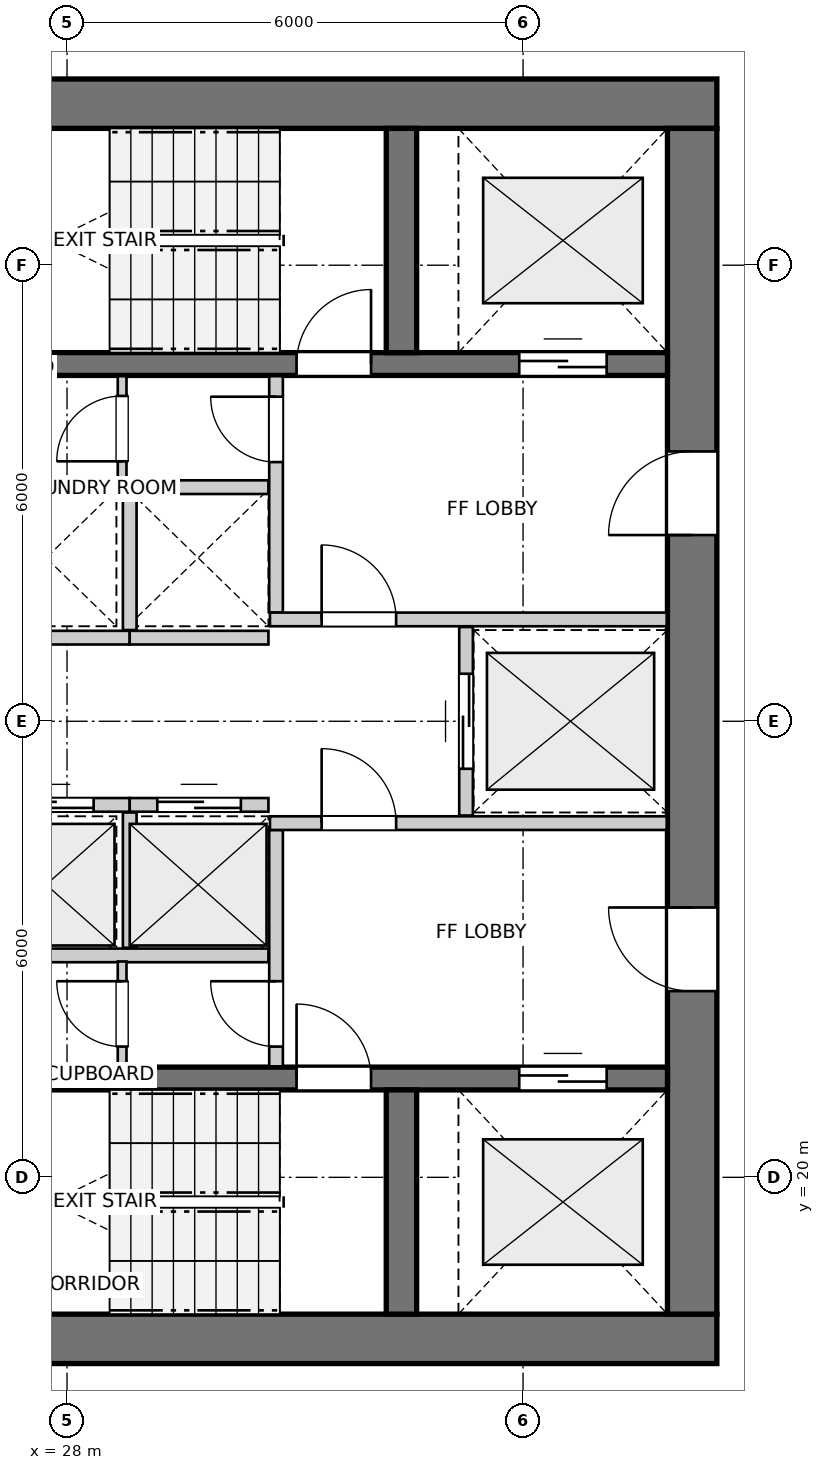
"""IFC4 building model, lengths in metres.
Left out: names, types, materials, properties, quantities, classifications, styles, units other than length and angle.
Written with IfcOpenShell. Run it as: python <this file> out.ifc"""

import sys

from ifc_helpers import new_model, si_unit, direction, frame, frame_2d, origin, place, context, subcontext, project, spatial, rectangle, extrude, source, transform, mapped, element, fill, save


model = new_model("IFC4")
c1 = context("Model", 3, precision=1e-05, world=origin(), true_north=direction((0.0, 1.0)))
c2 = subcontext(c1, "Body", "Model", "MODEL_VIEW")
j1 = project(units=[si_unit("LENGTHUNIT", "METRE"), si_unit("PLANEANGLEUNIT", "RADIAN")], contexts=[c1])
p1 = place(None, origin())
s1 = spatial("IfcSite", under=j1, at=p1, CompositionType="ELEMENT")
p2 = place(p1, origin())
s2 = spatial("IfcBuilding", under=s1, at=p2, CompositionType="ELEMENT")
p3 = place(p2, frame((0.0, 0.0, 92.8)))
s3 = spatial("IfcBuildingStorey", under=s2, at=p3, CompositionType="ELEMENT", Elevation=92.8)
for number, where, z_axis, x_axis in (
    (1, (24.15, 17.875, 0.0), (0.0, 0.0, 1.0), (1.0, 0.0, 0.0)),
    (2, (36.55, 34.125, 0.0), (0.0, 0.0, 1.0), (-1.0, 0.0, 0.0)),
):
    element("IfcWall", number, at=place(p3, frame(where, z_axis=z_axis, x_axis=x_axis)), inside=s3, PredefinedType="SHEAR", context=c2, shape_type="SweptSolid", body=[
        extrude(rectangle(XDim=12.4, YDim=0.65, at=frame_2d((6.2, 0.0))), origin(), (0.0, 0.0, 1.0), 2.95),
    ])
p4 = place(p3, frame((36.225, 18.2, 0.0), z_axis=(0.0, 0.0, 1.0), x_axis=(0.0, 1.0, 0.0)))
e3 = element("IfcWall", 3, at=p4, inside=s3, PredefinedType="SHEAR", context=c2, shape_type="SweptSolid", body=[
    extrude(rectangle(XDim=15.6, YDim=0.65, at=frame_2d((7.8, 0.0))), origin(), (0.0, 0.0, 1.0), 2.95),
])
p5 = place(p4, frame((4.25, 0.0, 0.0)))
e4 = element("IfcOpeningElement", 4, at=p5, cuts=e3, PredefinedType="OPENING", context=c2, shape_type="SweptSolid", body=[
    extrude(rectangle(XDim=1.1, YDim=2.15, at=frame_2d((0.55, 1.075))), frame((0.0, 0.335, 0.0), z_axis=(0.0, -1.0, 0.0), x_axis=(1.0, 0.0, 0.0)), (0.0, 0.0, 1.0), 0.67),
])
p6 = place(p4, frame((10.25, 0.0, 0.0)))
e5 = element("IfcOpeningElement", 5, at=p6, cuts=e3, PredefinedType="OPENING", context=c2, shape_type="SweptSolid", body=[
    extrude(rectangle(XDim=1.1, YDim=2.15, at=frame_2d((0.55, 1.075))), frame((0.0, 0.335, 0.0), z_axis=(0.0, -1.0, 0.0), x_axis=(1.0, 0.0, 0.0)), (0.0, 0.0, 1.0), 0.67),
])
p7 = place(p3, frame((24.8, 21.3, 0.0), z_axis=(0.0, 0.0, 1.0), x_axis=(1.0, 0.0, 0.0)))
e6 = element("IfcWall", 6, at=p7, inside=s3, PredefinedType="SHEAR", context=c2, shape_type="SweptSolid", body=[
    extrude(rectangle(XDim=11.1, YDim=0.3, at=frame_2d((5.55, 0.0))), origin(), (0.0, 0.0, 1.0), 2.95),
])
p8 = place(p7, frame((6.22, 0.0, 0.0)))
e7 = element("IfcOpeningElement", 7, at=p8, cuts=e6, PredefinedType="OPENING", context=c2, shape_type="SweptSolid", body=[
    extrude(rectangle(XDim=0.98, YDim=2.15, at=frame_2d((0.49, 1.075))), frame((0.0, 0.16, 0.0), z_axis=(0.0, -1.0, 0.0), x_axis=(1.0, 0.0, 0.0)), (0.0, 0.0, 1.0), 0.32),
])
p9 = place(p7, frame((9.15, 0.0, 0.0)))
e8 = element("IfcOpeningElement", 8, at=p9, cuts=e6, PredefinedType="OPENING", context=c2, shape_type="SweptSolid", body=[
    extrude(rectangle(XDim=1.15, YDim=2.15, at=frame_2d((0.575, 1.075))), frame((0.0, 0.16, 0.0), z_axis=(0.0, -1.0, 0.0), x_axis=(1.0, 0.0, 0.0)), (0.0, 0.0, 1.0), 0.32),
])
p10 = place(p3, frame((32.4, 18.2, 0.0), z_axis=(0.0, 0.0, 1.0), x_axis=(0.0, 1.0, 0.0)))
e9 = element("IfcWall", 9, at=p10, inside=s3, PredefinedType="SHEAR", context=c2, shape_type="SweptSolid", body=[
    extrude(rectangle(XDim=2.95, YDim=0.4, at=frame_2d((1.475, 0.0))), origin(), (0.0, 0.0, 1.0), 2.95),
])
p11 = place(p3, frame((24.8, 30.7, 0.0), z_axis=(0.0, 0.0, 1.0), x_axis=(1.0, 0.0, 0.0)))
e10 = element("IfcWall", 10, at=p11, inside=s3, PredefinedType="SHEAR", context=c2, shape_type="SweptSolid", body=[
    extrude(rectangle(XDim=11.1, YDim=0.3, at=frame_2d((5.55, 0.0))), origin(), (0.0, 0.0, 1.0), 2.95),
])
p12 = place(p11, frame((6.22, 0.0, 0.0)))
e11 = element("IfcOpeningElement", 11, at=p12, cuts=e10, PredefinedType="OPENING", context=c2, shape_type="SweptSolid", body=[
    extrude(rectangle(XDim=0.98, YDim=2.15, at=frame_2d((0.49, 1.075))), frame((0.0, 0.16, 0.0), z_axis=(0.0, -1.0, 0.0), x_axis=(1.0, 0.0, 0.0)), (0.0, 0.0, 1.0), 0.32),
])
p13 = place(p11, frame((9.15, 0.0, 0.0)))
e12 = element("IfcOpeningElement", 12, at=p13, cuts=e10, PredefinedType="OPENING", context=c2, shape_type="SweptSolid", body=[
    extrude(rectangle(XDim=1.15, YDim=2.15, at=frame_2d((0.575, 1.075))), frame((0.0, 0.16, 0.0), z_axis=(0.0, -1.0, 0.0), x_axis=(1.0, 0.0, 0.0)), (0.0, 0.0, 1.0), 0.32),
])
p14 = place(p3, frame((32.4, 30.85, 0.0), z_axis=(0.0, 0.0, 1.0), x_axis=(0.0, 1.0, 0.0)))
e13 = element("IfcWall", 13, at=p14, inside=s3, PredefinedType="SHEAR", context=c2, shape_type="SweptSolid", body=[
    extrude(rectangle(XDim=2.95, YDim=0.4, at=frame_2d((1.475, 0.0))), origin(), (0.0, 0.0, 1.0), 2.95),
])
p15 = place(p3, frame((30.75, 21.46, 0.0), z_axis=(0.0, 0.0, 1.0), x_axis=(0.0, 1.0, 0.0)))
e14 = element("IfcWall", 14, at=p15, inside=s3, PredefinedType="PARTITIONING", context=c2, shape_type="SweptSolid", body=[
    extrude(rectangle(XDim=3.11, YDim=0.18, at=frame_2d((1.555, 0.0))), origin(), (0.0, 0.0, 1.0), 2.95),
])
p16 = place(p15, frame((0.26, 0.0, 0.0)))
e15 = element("IfcOpeningElement", 15, at=p16, cuts=e14, PredefinedType="OPENING", context=c2, shape_type="SweptSolid", body=[
    extrude(rectangle(XDim=0.86, YDim=2.05, at=frame_2d((0.43, 1.025))), frame((0.0, 0.1, 0.0), z_axis=(0.0, -1.0, 0.0), x_axis=(1.0, 0.0, 0.0)), (0.0, 0.0, 1.0), 0.2),
])
p17 = place(p3, frame((30.67, 24.66, 0.0), z_axis=(0.0, 0.0, 1.0), x_axis=(1.0, 0.0, 0.0)))
e16 = element("IfcWall", 16, at=p17, inside=s3, PredefinedType="PARTITIONING", context=c2, shape_type="SweptSolid", body=[
    extrude(rectangle(XDim=5.22, YDim=0.18, at=frame_2d((2.61, 0.0))), origin(), (0.0, 0.0, 1.0), 2.95),
])
p18 = place(p17, frame((0.68, 0.0, 0.0)))
e17 = element("IfcOpeningElement", 17, at=p18, cuts=e16, PredefinedType="OPENING", context=c2, shape_type="SweptSolid", body=[
    extrude(rectangle(XDim=0.98, YDim=2.15, at=frame_2d((0.49, 1.075))), frame((0.0, 0.1, 0.0), z_axis=(0.0, -1.0, 0.0), x_axis=(1.0, 0.0, 0.0)), (0.0, 0.0, 1.0), 0.2),
])
p19 = place(p3, frame((30.75, 27.43, 0.0), z_axis=(0.0, 0.0, 1.0), x_axis=(0.0, 1.0, 0.0)))
e18 = element("IfcWall", 18, at=p19, inside=s3, PredefinedType="PARTITIONING", context=c2, shape_type="SweptSolid", body=[
    extrude(rectangle(XDim=3.11, YDim=0.18, at=frame_2d((1.555, 0.0))), origin(), (0.0, 0.0, 1.0), 2.95),
])
p20 = place(p19, frame((1.98, 0.0, 0.0)))
e19 = element("IfcOpeningElement", 19, at=p20, cuts=e18, PredefinedType="OPENING", context=c2, shape_type="SweptSolid", body=[
    extrude(rectangle(XDim=0.86, YDim=2.05, at=frame_2d((0.43, 1.025))), frame((0.0, 0.1, 0.0), z_axis=(0.0, -1.0, 0.0), x_axis=(1.0, 0.0, 0.0)), (0.0, 0.0, 1.0), 0.2),
])
p21 = place(p3, frame((30.67, 27.34, 0.0), z_axis=(0.0, 0.0, 1.0), x_axis=(1.0, 0.0, 0.0)))
e20 = element("IfcWall", 20, at=p21, inside=s3, PredefinedType="PARTITIONING", context=c2, shape_type="SweptSolid", body=[
    extrude(rectangle(XDim=5.22, YDim=0.18, at=frame_2d((2.61, 0.0))), origin(), (0.0, 0.0, 1.0), 2.95),
])
p22 = place(p21, frame((0.68, 0.0, 0.0)))
e21 = element("IfcOpeningElement", 21, at=p22, cuts=e20, PredefinedType="OPENING", context=c2, shape_type="SweptSolid", body=[
    extrude(rectangle(XDim=0.98, YDim=2.15, at=frame_2d((0.49, 1.075))), frame((0.0, 0.1, 0.0), z_axis=(0.0, -1.0, 0.0), x_axis=(1.0, 0.0, 0.0)), (0.0, 0.0, 1.0), 0.2),
])
p23 = place(p3, frame((33.25, 24.76, 0.0), z_axis=(0.0, 0.0, 1.0), x_axis=(0.0, 1.0, 0.0)))
e22 = element("IfcWall", 22, at=p23, inside=s3, PredefinedType="PARTITIONING", context=c2, shape_type="SweptSolid", body=[
    extrude(rectangle(XDim=2.48, YDim=0.18, at=frame_2d((1.24, 0.0))), origin(), (0.0, 0.0, 1.0), 2.95),
])
p24 = place(p23, frame((0.615, 0.0, 0.0)))
e23 = element("IfcOpeningElement", 23, at=p24, cuts=e22, PredefinedType="OPENING", context=c2, shape_type="SweptSolid", body=[
    extrude(rectangle(XDim=1.25, YDim=2.15, at=frame_2d((0.625, 1.075))), frame((0.0, 0.1, 0.0), z_axis=(0.0, -1.0, 0.0), x_axis=(1.0, 0.0, 0.0)), (0.0, 0.0, 1.0), 0.2),
])
p25 = place(p3, frame((24.81, 22.92, 0.0), z_axis=(0.0, 0.0, 1.0), x_axis=(1.0, 0.0, 0.0)))
e24 = element("IfcWall", 24, at=p25, inside=s3, PredefinedType="PARTITIONING", context=c2, shape_type="SweptSolid", body=[
    extrude(rectangle(XDim=5.84, YDim=0.18, at=frame_2d((2.92, 0.0))), origin(), (0.0, 0.0, 1.0), 2.95),
])
p26 = place(p3, frame((26.775, 24.9, 0.0), z_axis=(0.0, 0.0, 1.0), x_axis=(1.0, 0.0, 0.0)))
e25 = element("IfcWall", 25, at=p26, inside=s3, PredefinedType="PARTITIONING", context=c2, shape_type="SweptSolid", body=[
    extrude(rectangle(XDim=2.05, YDim=0.18, at=frame_2d((1.025, 0.0))), origin(), (0.0, 0.0, 1.0), 2.95),
])
p27 = place(p26, frame((0.475, 0.0, 0.0)))
e26 = element("IfcOpeningElement", 26, at=p27, cuts=e25, PredefinedType="OPENING", context=c2, shape_type="SweptSolid", body=[
    extrude(rectangle(XDim=1.1, YDim=2.15, at=frame_2d((0.55, 1.075))), frame((0.0, 0.1, 0.0), z_axis=(0.0, -1.0, 0.0), x_axis=(1.0, 0.0, 0.0)), (0.0, 0.0, 1.0), 0.2),
])
p28 = place(p3, frame((28.825, 24.9, 0.0), z_axis=(0.0, 0.0, 1.0), x_axis=(1.0, 0.0, 0.0)))
e27 = element("IfcWall", 27, at=p28, inside=s3, PredefinedType="PARTITIONING", context=c2, shape_type="SweptSolid", body=[
    extrude(rectangle(XDim=1.825, YDim=0.18, at=frame_2d((0.913, 0.0))), origin(), (0.0, 0.0, 1.0), 2.95),
])
p29 = place(p28, frame((0.363, 0.0, 0.0)))
e28 = element("IfcOpeningElement", 28, at=p29, cuts=e27, PredefinedType="OPENING", context=c2, shape_type="SweptSolid", body=[
    extrude(rectangle(XDim=1.1, YDim=2.15, at=frame_2d((0.55, 1.075))), frame((0.0, 0.1, 0.0), z_axis=(0.0, -1.0, 0.0), x_axis=(1.0, 0.0, 0.0)), (0.0, 0.0, 1.0), 0.2),
])
p30 = place(p3, frame((28.825, 23.02, 0.0), z_axis=(0.0, 0.0, 1.0), x_axis=(0.0, 1.0, 0.0)))
e29 = element("IfcWall", 29, at=p30, inside=s3, PredefinedType="PARTITIONING", context=c2, shape_type="SweptSolid", body=[
    extrude(rectangle(XDim=1.78, YDim=0.18, at=frame_2d((0.89, 0.0))), origin(), (0.0, 0.0, 1.0), 2.95),
])
p31 = place(p3, frame((24.81, 29.08, 0.0), z_axis=(0.0, 0.0, 1.0), x_axis=(1.0, 0.0, 0.0)))
e30 = element("IfcWall", 30, at=p31, inside=s3, PredefinedType="PARTITIONING", context=c2, shape_type="SweptSolid", body=[
    extrude(rectangle(XDim=5.84, YDim=0.18, at=frame_2d((2.92, 0.0))), origin(), (0.0, 0.0, 1.0), 2.95),
])
p32 = place(p3, frame((26.775, 27.1, 0.0), z_axis=(0.0, 0.0, 1.0), x_axis=(1.0, 0.0, 0.0)))
e31 = element("IfcWall", 31, at=p32, inside=s3, PredefinedType="PARTITIONING", context=c2, shape_type="SweptSolid", body=[
    extrude(rectangle(XDim=2.05, YDim=0.18, at=frame_2d((1.025, 0.0))), origin(), (0.0, 0.0, 1.0), 2.95),
])
p33 = place(p3, frame((28.825, 27.1, 0.0), z_axis=(0.0, 0.0, 1.0), x_axis=(1.0, 0.0, 0.0)))
e32 = element("IfcWall", 32, at=p33, inside=s3, PredefinedType="PARTITIONING", context=c2, shape_type="SweptSolid", body=[
    extrude(rectangle(XDim=1.825, YDim=0.18, at=frame_2d((0.913, 0.0))), origin(), (0.0, 0.0, 1.0), 2.95),
])
p34 = place(p3, frame((28.825, 27.2, 0.0), z_axis=(0.0, 0.0, 1.0), x_axis=(0.0, 1.0, 0.0)))
e33 = element("IfcWall", 33, at=p34, inside=s3, PredefinedType="PARTITIONING", context=c2, shape_type="SweptSolid", body=[
    extrude(rectangle(XDim=1.78, YDim=0.18, at=frame_2d((0.89, 0.0))), origin(), (0.0, 0.0, 1.0), 2.95),
])
p35 = place(p3, frame((28.725, 21.46, 0.0), z_axis=(0.0, 0.0, 1.0), x_axis=(0.0, 1.0, 0.0)))
e34 = element("IfcWall", 34, at=p35, inside=s3, PredefinedType="PARTITIONING", context=c2, shape_type="SweptSolid", body=[
    extrude(rectangle(XDim=1.38, YDim=0.115, at=frame_2d((0.69, 0.0))), origin(), (0.0, 0.0, 1.0), 2.95),
])
p36 = place(p35, frame((0.26, 0.0, 0.0)))
e35 = element("IfcOpeningElement", 35, at=p36, cuts=e34, PredefinedType="OPENING", context=c2, shape_type="SweptSolid", body=[
    extrude(rectangle(XDim=0.86, YDim=2.05, at=frame_2d((0.43, 1.025))), frame((0.0, 0.067, 0.0), z_axis=(0.0, -1.0, 0.0), x_axis=(1.0, 0.0, 0.0)), (0.0, 0.0, 1.0), 0.135),
])
p37 = place(p3, frame((28.725, 29.16, 0.0), z_axis=(0.0, 0.0, 1.0), x_axis=(0.0, 1.0, 0.0)))
e36 = element("IfcWall", 36, at=p37, inside=s3, PredefinedType="PARTITIONING", context=c2, shape_type="SweptSolid", body=[
    extrude(rectangle(XDim=1.38, YDim=0.115, at=frame_2d((0.69, 0.0))), origin(), (0.0, 0.0, 1.0), 2.95),
])
p38 = place(p37, frame((0.26, 0.0, 0.0)))
e37 = element("IfcOpeningElement", 37, at=p38, cuts=e36, PredefinedType="OPENING", context=c2, shape_type="SweptSolid", body=[
    extrude(rectangle(XDim=0.86, YDim=2.05, at=frame_2d((0.43, 1.025))), frame((0.0, 0.067, 0.0), z_axis=(0.0, -1.0, 0.0), x_axis=(1.0, 0.0, 0.0)), (0.0, 0.0, 1.0), 0.135),
])
m1 = source(origin(), c2, "Body", "SweptSolid", [
    extrude(rectangle(XDim=0.98, YDim=2.15, at=frame_2d((0.49, 1.075))), frame((0.0, 0.025, 0.0), z_axis=(0.0, -1.0, 0.0), x_axis=(1.0, 0.0, 0.0)), (0.0, 0.0, 1.0), 0.05),
])
p39 = place(p8, origin())
e38 = element("IfcDoor", 38, at=p39, inside=s3, OperationType="SINGLE_SWING_LEFT", PredefinedType="DOOR", context=c2, shape_type="MappedRepresentation", body=[
    mapped(m1, transform((0.0, 0.0, 0.0), x_axis=(1.0, 0.0, 0.0), y_axis=(0.0, 1.0, 0.0), z_axis=(0.0, 0.0, 1.0), scale=1.0)),
])
fill(e7, e38)
m2 = source(origin(), c2, "Body", "SweptSolid", [
    extrude(rectangle(XDim=1.15, YDim=2.15, at=frame_2d((0.575, 1.075))), frame((0.0, 0.025, 0.0), z_axis=(0.0, -1.0, 0.0), x_axis=(1.0, 0.0, 0.0)), (0.0, 0.0, 1.0), 0.05),
])
p40 = place(p9, origin())
e39 = element("IfcDoor", 39, at=p40, inside=s3, OperationType="DOUBLE_DOOR_SLIDING", PredefinedType="DOOR", context=c2, shape_type="MappedRepresentation", body=[
    mapped(m2, transform((0.0, 0.0, 0.0), x_axis=(1.0, 0.0, 0.0), y_axis=(0.0, 1.0, 0.0), z_axis=(0.0, 0.0, 1.0), scale=1.0)),
])
fill(e8, e39)
p41 = place(p12, origin())
e40 = element("IfcDoor", 40, at=p41, inside=s3, OperationType="SINGLE_SWING_RIGHT", PredefinedType="DOOR", context=c2, shape_type="MappedRepresentation", body=[
    mapped(m1, transform((0.0, 0.0, 0.0), x_axis=(1.0, 0.0, 0.0), y_axis=(0.0, 1.0, 0.0), z_axis=(0.0, 0.0, 1.0), scale=1.0)),
])
fill(e11, e40)
p42 = place(p13, origin())
e41 = element("IfcDoor", 41, at=p42, inside=s3, OperationType="DOUBLE_DOOR_SLIDING", PredefinedType="DOOR", context=c2, shape_type="MappedRepresentation", body=[
    mapped(m2, transform((0.0, 0.0, 0.0), x_axis=(1.0, 0.0, 0.0), y_axis=(0.0, 1.0, 0.0), z_axis=(0.0, 0.0, 1.0), scale=1.0)),
])
fill(e12, e41)
m3 = source(origin(), c2, "Body", "SweptSolid", [
    extrude(rectangle(XDim=1.1, YDim=2.15, at=frame_2d((0.55, 1.075))), frame((0.0, 0.025, 0.0), z_axis=(0.0, -1.0, 0.0), x_axis=(1.0, 0.0, 0.0)), (0.0, 0.0, 1.0), 0.05),
])
p43 = place(p5, origin())
e42 = element("IfcDoor", 42, at=p43, inside=s3, OperationType="SINGLE_SWING_RIGHT", PredefinedType="DOOR", context=c2, shape_type="MappedRepresentation", body=[
    mapped(m3, transform((0.0, 0.0, 0.0), x_axis=(1.0, 0.0, 0.0), y_axis=(0.0, 1.0, 0.0), z_axis=(0.0, 0.0, 1.0), scale=1.0)),
])
fill(e4, e42)
p44 = place(p6, origin())
e43 = element("IfcDoor", 43, at=p44, inside=s3, OperationType="SINGLE_SWING_LEFT", PredefinedType="DOOR", context=c2, shape_type="MappedRepresentation", body=[
    mapped(m3, transform((0.0, 0.0, 0.0), x_axis=(1.0, 0.0, 0.0), y_axis=(0.0, 1.0, 0.0), z_axis=(0.0, 0.0, 1.0), scale=1.0)),
])
fill(e5, e43)
m4 = source(origin(), c2, "Body", "SweptSolid", [
    extrude(rectangle(XDim=0.86, YDim=2.05, at=frame_2d((0.43, 1.025))), frame((0.0, 0.025, 0.0), z_axis=(0.0, -1.0, 0.0), x_axis=(1.0, 0.0, 0.0)), (0.0, 0.0, 1.0), 0.05),
])
p45 = place(p16, origin())
e44 = element("IfcDoor", 44, at=p45, inside=s3, OperationType="SINGLE_SWING_RIGHT", PredefinedType="DOOR", context=c2, shape_type="MappedRepresentation", body=[
    mapped(m4, transform((0.0, 0.0, 0.0), x_axis=(1.0, 0.0, 0.0), y_axis=(0.0, 1.0, 0.0), z_axis=(0.0, 0.0, 1.0), scale=1.0)),
])
fill(e15, e44)
p46 = place(p18, origin())
e45 = element("IfcDoor", 45, at=p46, inside=s3, OperationType="SINGLE_SWING_LEFT", PredefinedType="DOOR", context=c2, shape_type="MappedRepresentation", body=[
    mapped(m1, transform((0.0, 0.0, 0.0), x_axis=(1.0, 0.0, 0.0), y_axis=(0.0, 1.0, 0.0), z_axis=(0.0, 0.0, 1.0), scale=1.0)),
])
fill(e17, e45)
p47 = place(p20, origin())
e46 = element("IfcDoor", 46, at=p47, inside=s3, OperationType="SINGLE_SWING_RIGHT", PredefinedType="DOOR", context=c2, shape_type="MappedRepresentation", body=[
    mapped(m4, transform((0.0, 0.0, 0.0), x_axis=(1.0, 0.0, 0.0), y_axis=(0.0, 1.0, 0.0), z_axis=(0.0, 0.0, 1.0), scale=1.0)),
])
fill(e19, e46)
p48 = place(p22, origin())
e47 = element("IfcDoor", 47, at=p48, inside=s3, OperationType="SINGLE_SWING_LEFT", PredefinedType="DOOR", context=c2, shape_type="MappedRepresentation", body=[
    mapped(m1, transform((0.0, 0.0, 0.0), x_axis=(1.0, 0.0, 0.0), y_axis=(0.0, 1.0, 0.0), z_axis=(0.0, 0.0, 1.0), scale=1.0)),
])
fill(e21, e47)
m5 = source(origin(), c2, "Body", "SweptSolid", [
    extrude(rectangle(XDim=1.25, YDim=2.15, at=frame_2d((0.625, 1.075))), frame((0.0, 0.025, 0.0), z_axis=(0.0, -1.0, 0.0), x_axis=(1.0, 0.0, 0.0)), (0.0, 0.0, 1.0), 0.05),
])
p49 = place(p24, origin())
e48 = element("IfcDoor", 48, at=p49, inside=s3, OperationType="DOUBLE_DOOR_SLIDING", PredefinedType="DOOR", context=c2, shape_type="MappedRepresentation", body=[
    mapped(m5, transform((0.0, 0.0, 0.0), x_axis=(1.0, 0.0, 0.0), y_axis=(0.0, 1.0, 0.0), z_axis=(0.0, 0.0, 1.0), scale=1.0)),
])
fill(e23, e48)
p50 = place(p27, origin())
e49 = element("IfcDoor", 49, at=p50, inside=s3, OperationType="DOUBLE_DOOR_SLIDING", PredefinedType="DOOR", context=c2, shape_type="MappedRepresentation", body=[
    mapped(m3, transform((0.0, 0.0, 0.0), x_axis=(1.0, 0.0, 0.0), y_axis=(0.0, 1.0, 0.0), z_axis=(0.0, 0.0, 1.0), scale=1.0)),
])
fill(e26, e49)
p51 = place(p29, origin())
e50 = element("IfcDoor", 50, at=p51, inside=s3, OperationType="DOUBLE_DOOR_SLIDING", PredefinedType="DOOR", context=c2, shape_type="MappedRepresentation", body=[
    mapped(m3, transform((0.0, 0.0, 0.0), x_axis=(1.0, 0.0, 0.0), y_axis=(0.0, 1.0, 0.0), z_axis=(0.0, 0.0, 1.0), scale=1.0)),
])
fill(e28, e50)
p52 = place(p36, origin())
e51 = element("IfcDoor", 51, at=p52, inside=s3, OperationType="SINGLE_SWING_RIGHT", PredefinedType="DOOR", context=c2, shape_type="MappedRepresentation", body=[
    mapped(m4, transform((0.0, 0.0, 0.0), x_axis=(1.0, 0.0, 0.0), y_axis=(0.0, 1.0, 0.0), z_axis=(0.0, 0.0, 1.0), scale=1.0)),
])
fill(e35, e51)
p53 = place(p38, origin())
e52 = element("IfcDoor", 52, at=p53, inside=s3, OperationType="SINGLE_SWING_LEFT", PredefinedType="DOOR", context=c2, shape_type="MappedRepresentation", body=[
    mapped(m4, transform((0.0, 0.0, 0.0), x_axis=(1.0, 0.0, 0.0), y_axis=(0.0, 1.0, 0.0), z_axis=(0.0, 0.0, 1.0), scale=1.0)),
])
fill(e37, e52)
save(model, sys.argv[1])
